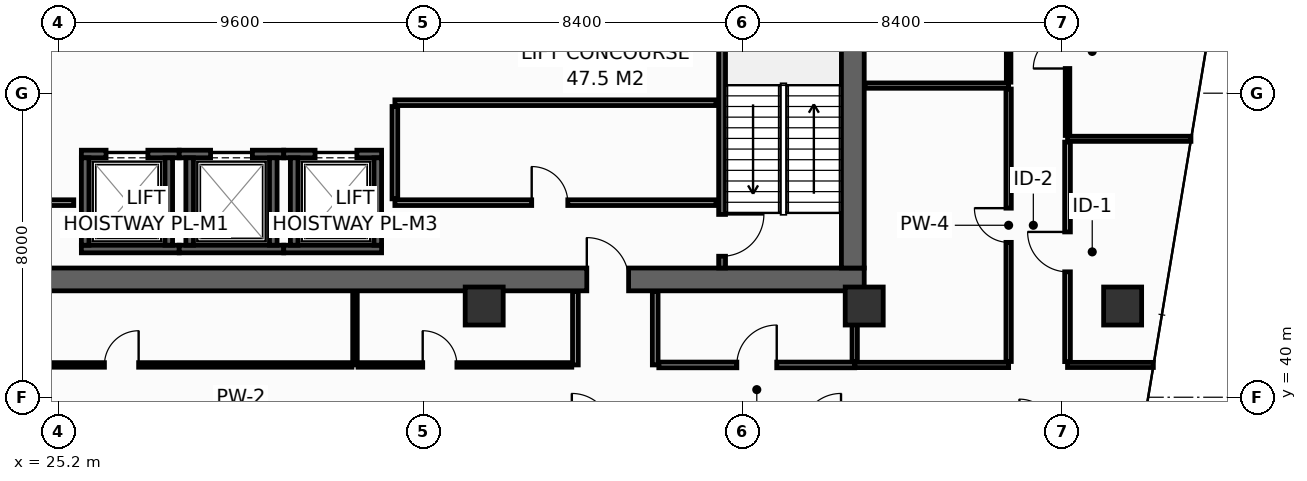
"""IFC4 building model, lengths in metres.
Left out: names, types, materials, properties, quantities, classifications, styles, units other than length and angle.
Written with IfcOpenShell. Run it as: python <this file> out.ifc"""

import sys

from ifc_helpers import new_model, si_unit, direction, frame, frame_2d, origin, origin_2d, place, context, subcontext, project, spatial, rectangle, hollow_rectangle, extrude, element, fill, save


model = new_model("IFC4")
c1 = context("Model", 3, precision=1e-05, world=origin(), true_north=direction((0.0, 1.0)))
c2 = subcontext(c1, "Body", "Model", "MODEL_VIEW")
j1 = project(units=[si_unit("LENGTHUNIT", "METRE"), si_unit("PLANEANGLEUNIT", "RADIAN")], contexts=[c1])
p1 = place(None, origin())
s1 = spatial("IfcSite", under=j1, at=p1, CompositionType="ELEMENT")
p2 = place(p1, origin())
s2 = spatial("IfcBuilding", under=s1, at=p2, CompositionType="ELEMENT")
p3 = place(p2, frame((0.0, 0.0, 119.2)))
s3 = spatial("IfcBuildingStorey", under=s2, at=p3, CompositionType="ELEMENT", Elevation=119.2)
p4 = place(p3, frame((13.5, 43.1, 0.0), z_axis=(0.0, 0.0, 1.0), x_axis=(1.0, 0.0, 0.0)))
e1 = element("IfcWall", 1, at=p4, inside=s3, PredefinedType="SHEAR", context=c2, shape_type="SweptSolid", body=[
    extrude(rectangle(XDim=32.9, YDim=0.6, at=frame_2d((16.45, 0.0))), origin(), (0.0, 0.0, 1.0), 3.95),
])
p5 = place(p4, frame((5.4, 0.0, 0.0)))
e2 = element("IfcOpeningElement", 2, at=p5, cuts=e1, PredefinedType="OPENING", context=c2, shape_type="SweptSolid", body=[
    extrude(rectangle(XDim=1.1, YDim=2.15, at=frame_2d((0.55, 1.075))), frame((0.0, 0.31, 0.0), z_axis=(0.0, -1.0, 0.0), x_axis=(1.0, 0.0, 0.0)), (0.0, 0.0, 1.0), 0.62),
])
p6 = place(p4, frame((25.6, 0.0, 0.0)))
e3 = element("IfcOpeningElement", 3, at=p6, cuts=e1, PredefinedType="OPENING", context=c2, shape_type="SweptSolid", body=[
    extrude(rectangle(XDim=1.1, YDim=2.15, at=frame_2d((0.55, 1.075))), frame((0.0, 0.31, 0.0), z_axis=(0.0, -1.0, 0.0), x_axis=(1.0, 0.0, 0.0)), (0.0, 0.0, 1.0), 0.62),
])
p7 = place(p3, frame((46.1, 43.4, 0.0), z_axis=(0.0, 0.0, 1.0), x_axis=(0.0, 1.0, 0.0)))
e4 = element("IfcWall", 4, at=p7, inside=s3, PredefinedType="SHEAR", context=c2, shape_type="SweptSolid", body=[
    extrude(rectangle(XDim=10.4, YDim=0.6, at=frame_2d((5.2, 0.0))), origin(), (0.0, 0.0, 1.0), 3.95),
])
for number, where, z_axis, x_axis in (
    (5, (36.4, 42.4, 0.0), (0.0, 0.0, 1.0), (1.0, 0.0, 0.0)),
    (6, (46.4, 42.4, 0.0), (0.0, 0.0, 1.0), (1.0, 0.0, 0.0)),
    (7, (53.2, 42.4, 0.0), (0.0, 0.0, 1.0), (1.0, 0.0, 0.0)),
):
    element("IfcColumn", number, at=place(p3, frame(where, z_axis=z_axis, x_axis=x_axis)), inside=s3, PredefinedType="COLUMN", context=c2, shape_type="SweptSolid", body=[
        extrude(hollow_rectangle(XDim=1.0, YDim=1.0, WallThickness=0.045, at=origin_2d()), origin(), (0.0, 0.0, 1.0), 4.4),
    ])
p8 = place(p3, frame((25.8, 43.9, 0.0), z_axis=(0.0, 0.0, 1.0), x_axis=(1.0, 0.0, 0.0)))
e8 = element("IfcWall", 8, at=p8, inside=s3, PredefinedType="SHEAR", context=c2, shape_type="SweptSolid", body=[
    extrude(rectangle(XDim=2.575, YDim=0.2, at=frame_2d((1.288, 0.0))), origin(), (0.0, 0.0, 1.0), 3.95),
])
p9 = place(p3, frame((25.8, 46.4, 0.0), z_axis=(0.0, 0.0, 1.0), x_axis=(1.0, 0.0, 0.0)))
e9 = element("IfcWall", 9, at=p9, inside=s3, PredefinedType="SHEAR", context=c2, shape_type="SweptSolid", body=[
    extrude(rectangle(XDim=2.575, YDim=0.2, at=frame_2d((1.288, 0.0))), origin(), (0.0, 0.0, 1.0), 3.95),
])
p10 = place(p9, frame((0.65, 0.0, 0.0)))
e10 = element("IfcOpeningElement", 10, at=p10, cuts=e9, PredefinedType="OPENING", context=c2, shape_type="SweptSolid", body=[
    extrude(rectangle(XDim=1.1, YDim=2.2, at=frame_2d((0.55, 1.1))), frame((0.0, 0.11, 0.0), z_axis=(0.0, -1.0, 0.0), x_axis=(1.0, 0.0, 0.0)), (0.0, 0.0, 1.0), 0.22),
])
for number, where, z_axis, x_axis in (
    (11, (25.9, 44.0, 0.0), (0.0, 0.0, 1.0), (0.0, 1.0, 0.0)),
    (12, (28.1, 44.0, 0.0), (0.0, 0.0, 1.0), (0.0, 1.0, 0.0)),
):
    element("IfcWall", number, at=place(p3, frame(where, z_axis=z_axis, x_axis=x_axis)), inside=s3, PredefinedType="SHEAR", context=c2, shape_type="SweptSolid", body=[
        extrude(rectangle(XDim=2.3, YDim=0.2, at=frame_2d((1.15, 0.0))), origin(), (0.0, 0.0, 1.0), 3.95),
    ])
p11 = place(p3, frame((28.375, 43.9, 0.0), z_axis=(0.0, 0.0, 1.0), x_axis=(1.0, 0.0, 0.0)))
e13 = element("IfcWall", 13, at=p11, inside=s3, PredefinedType="SHEAR", context=c2, shape_type="SweptSolid", body=[
    extrude(rectangle(XDim=2.75, YDim=0.2, at=frame_2d((1.375, 0.0))), origin(), (0.0, 0.0, 1.0), 3.95),
])
p12 = place(p3, frame((28.375, 46.4, 0.0), z_axis=(0.0, 0.0, 1.0), x_axis=(1.0, 0.0, 0.0)))
e14 = element("IfcWall", 14, at=p12, inside=s3, PredefinedType="SHEAR", context=c2, shape_type="SweptSolid", body=[
    extrude(rectangle(XDim=2.75, YDim=0.2, at=frame_2d((1.375, 0.0))), origin(), (0.0, 0.0, 1.0), 3.95),
])
p13 = place(p12, frame((0.825, 0.0, 0.0)))
e15 = element("IfcOpeningElement", 15, at=p13, cuts=e14, PredefinedType="OPENING", context=c2, shape_type="SweptSolid", body=[
    extrude(rectangle(XDim=1.1, YDim=2.2, at=frame_2d((0.55, 1.1))), frame((0.0, 0.11, 0.0), z_axis=(0.0, -1.0, 0.0), x_axis=(1.0, 0.0, 0.0)), (0.0, 0.0, 1.0), 0.22),
])
for number, where, z_axis, x_axis in (
    (16, (28.65, 44.0, 0.0), (0.0, 0.0, 1.0), (0.0, 1.0, 0.0)),
    (17, (30.85, 44.0, 0.0), (0.0, 0.0, 1.0), (0.0, 1.0, 0.0)),
):
    element("IfcWall", number, at=place(p3, frame(where, z_axis=z_axis, x_axis=x_axis)), inside=s3, PredefinedType="SHEAR", context=c2, shape_type="SweptSolid", body=[
        extrude(rectangle(XDim=2.3, YDim=0.2, at=frame_2d((1.15, 0.0))), origin(), (0.0, 0.0, 1.0), 3.95),
    ])
p14 = place(p3, frame((31.125, 43.9, 0.0), z_axis=(0.0, 0.0, 1.0), x_axis=(1.0, 0.0, 0.0)))
e18 = element("IfcWall", 18, at=p14, inside=s3, PredefinedType="SHEAR", context=c2, shape_type="SweptSolid", body=[
    extrude(rectangle(XDim=2.575, YDim=0.2, at=frame_2d((1.288, 0.0))), origin(), (0.0, 0.0, 1.0), 3.95),
])
p15 = place(p3, frame((31.125, 46.4, 0.0), z_axis=(0.0, 0.0, 1.0), x_axis=(1.0, 0.0, 0.0)))
e19 = element("IfcWall", 19, at=p15, inside=s3, PredefinedType="SHEAR", context=c2, shape_type="SweptSolid", body=[
    extrude(rectangle(XDim=2.575, YDim=0.2, at=frame_2d((1.288, 0.0))), origin(), (0.0, 0.0, 1.0), 3.95),
])
p16 = place(p15, frame((0.825, 0.0, 0.0)))
e20 = element("IfcOpeningElement", 20, at=p16, cuts=e19, PredefinedType="OPENING", context=c2, shape_type="SweptSolid", body=[
    extrude(rectangle(XDim=1.1, YDim=2.2, at=frame_2d((0.55, 1.1))), frame((0.0, 0.11, 0.0), z_axis=(0.0, -1.0, 0.0), x_axis=(1.0, 0.0, 0.0)), (0.0, 0.0, 1.0), 0.22),
])
for number, where, z_axis, x_axis in (
    (21, (31.4, 44.0, 0.0), (0.0, 0.0, 1.0), (0.0, 1.0, 0.0)),
    (22, (33.6, 44.0, 0.0), (0.0, 0.0, 1.0), (0.0, 1.0, 0.0)),
):
    element("IfcWall", number, at=place(p3, frame(where, z_axis=z_axis, x_axis=x_axis)), inside=s3, PredefinedType="SHEAR", context=c2, shape_type="SweptSolid", body=[
        extrude(rectangle(XDim=2.3, YDim=0.2, at=frame_2d((1.15, 0.0))), origin(), (0.0, 0.0, 1.0), 3.95),
    ])
p17 = place(p3, frame((42.66, 53.8, 0.0), z_axis=(0.0, 0.0, 1.0), x_axis=(0.0, -1.0, 0.0)))
e23 = element("IfcWall", 23, at=p17, inside=s3, PredefinedType="SHEAR", context=c2, shape_type="SweptSolid", body=[
    extrude(rectangle(XDim=10.4, YDim=0.18, at=frame_2d((5.2, 0.0))), origin(), (0.0, 0.0, 1.0), 3.95),
])
p18 = place(p17, frame((8.99, 0.0, 0.0)))
e24 = element("IfcOpeningElement", 24, at=p18, cuts=e23, PredefinedType="OPENING", context=c2, shape_type="SweptSolid", body=[
    extrude(rectangle(XDim=1.1, YDim=2.15, at=frame_2d((0.55, 1.075))), frame((0.0, 0.1, 0.0), z_axis=(0.0, -1.0, 0.0), x_axis=(1.0, 0.0, 0.0)), (0.0, 0.0, 1.0), 0.2),
])
p19 = place(p3, frame((22.68, 45.12, 0.0), z_axis=(0.0, 0.0, 1.0), x_axis=(1.0, 0.0, 0.0)))
e25 = element("IfcWall", 25, at=p19, inside=s3, PredefinedType="PARTITIONING", context=c2, shape_type="SweptSolid", body=[
    extrude(rectangle(XDim=2.92, YDim=0.15, at=frame_2d((1.46, 0.0))), origin(), (0.0, 0.0, 1.0), 3.95),
])
p20 = place(p19, frame((0.85, 0.0, 0.0)))
e26 = element("IfcOpeningElement", 26, at=p20, cuts=e25, PredefinedType="OPENING", context=c2, shape_type="SweptSolid", body=[
    extrude(rectangle(XDim=1.1, YDim=2.15, at=frame_2d((0.55, 1.075))), frame((0.0, 0.085, 0.0), z_axis=(0.0, -1.0, 0.0), x_axis=(1.0, 0.0, 0.0)), (0.0, 0.0, 1.0), 0.17),
])
p21 = place(p3, frame((34.05, 45.12, 0.0), z_axis=(0.0, 0.0, 1.0), x_axis=(1.0, 0.0, 0.0)))
e27 = element("IfcWall", 27, at=p21, inside=s3, PredefinedType="PARTITIONING", context=c2, shape_type="SweptSolid", body=[
    extrude(rectangle(XDim=8.45, YDim=0.15, at=frame_2d((4.225, 0.0))), origin(), (0.0, 0.0, 1.0), 3.95),
])
p22 = place(p21, frame((3.6, 0.0, 0.0)))
e28 = element("IfcOpeningElement", 28, at=p22, cuts=e27, PredefinedType="OPENING", context=c2, shape_type="SweptSolid", body=[
    extrude(rectangle(XDim=0.95, YDim=2.15, at=frame_2d((0.475, 1.075))), frame((0.0, 0.085, 0.0), z_axis=(0.0, -1.0, 0.0), x_axis=(1.0, 0.0, 0.0)), (0.0, 0.0, 1.0), 0.17),
])
p23 = place(p3, frame((34.05, 47.75, 0.0), z_axis=(0.0, 0.0, 1.0), x_axis=(1.0, 0.0, 0.0)))
e29 = element("IfcWall", 29, at=p23, inside=s3, PredefinedType="PARTITIONING", context=c2, shape_type="SweptSolid", body=[
    extrude(rectangle(XDim=8.45, YDim=0.15, at=frame_2d((4.225, 0.0))), origin(), (0.0, 0.0, 1.0), 3.95),
])
p24 = place(p3, frame((34.05, 45.22, 0.0), z_axis=(0.0, 0.0, 1.0), x_axis=(0.0, 1.0, 0.0)))
e30 = element("IfcWall", 30, at=p24, inside=s3, PredefinedType="PARTITIONING", context=c2, shape_type="SweptSolid", body=[
    extrude(rectangle(XDim=2.43, YDim=0.15, at=frame_2d((1.215, 0.0))), origin(), (0.0, 0.0, 1.0), 3.95),
])
p25 = place(p3, frame((46.15, 40.85, 0.0), z_axis=(0.0, 0.0, 1.0), x_axis=(1.0, 0.0, 0.0)))
e31 = element("IfcWall", 31, at=p25, inside=s3, PredefinedType="PARTITIONING", context=c2, shape_type="SweptSolid", body=[
    extrude(rectangle(XDim=4.05, YDim=0.14, at=frame_2d((2.025, 0.0))), origin(), (0.0, 0.0, 1.0), 3.95),
])
p26 = place(p3, frame((46.15, 40.94, 0.0), z_axis=(0.0, 0.0, 1.0), x_axis=(0.0, 1.0, 0.0)))
e32 = element("IfcWall", 32, at=p26, inside=s3, PredefinedType="PARTITIONING", context=c2, shape_type="SweptSolid", body=[
    extrude(rectangle(XDim=1.84, YDim=0.14, at=frame_2d((0.92, 0.0))), origin(), (0.0, 0.0, 1.0), 3.95),
])
p27 = place(p3, frame((46.42, 48.2, 0.0), z_axis=(0.0, 0.0, 1.0), x_axis=(1.0, 0.0, 0.0)))
e33 = element("IfcWall", 33, at=p27, inside=s3, PredefinedType="PARTITIONING", context=c2, shape_type="SweptSolid", body=[
    extrude(rectangle(XDim=3.78, YDim=0.14, at=frame_2d((1.89, 0.0))), origin(), (0.0, 0.0, 1.0), 3.95),
])
p28 = place(p3, frame((50.2, 40.94, 0.0), z_axis=(0.0, 0.0, 1.0), x_axis=(0.0, 1.0, 0.0)))
e34 = element("IfcWall", 34, at=p28, inside=s3, PredefinedType="PARTITIONING", context=c2, shape_type="SweptSolid", body=[
    extrude(rectangle(XDim=7.17, YDim=0.14, at=frame_2d((3.585, 0.0))), origin(), (0.0, 0.0, 1.0), 3.135),
])
p29 = place(p28, frame((3.135, 0.0, 0.0)))
e35 = element("IfcOpeningElement", 35, at=p29, cuts=e34, PredefinedType="OPENING", context=c2, shape_type="SweptSolid", body=[
    extrude(rectangle(XDim=0.9, YDim=2.1, at=frame_2d((0.45, 1.05))), frame((0.0, 0.08, 0.0), z_axis=(0.0, -1.0, 0.0), x_axis=(1.0, 0.0, 0.0)), (0.0, 0.0, 1.0), 0.16),
])
p30 = place(p3, frame((50.2, 48.29, 0.0), z_axis=(0.0, 0.0, 1.0), x_axis=(0.0, 1.0, 0.0)))
e36 = element("IfcWall", 36, at=p30, inside=s3, PredefinedType="PARTITIONING", context=c2, shape_type="SweptSolid", body=[
    extrude(rectangle(XDim=7.705, YDim=0.12, at=frame_2d((3.853, 0.0))), origin(), (0.0, 0.0, 1.0), 3.235),
])
p31 = place(p30, frame((3.402, 0.0, 0.0)))
e37 = element("IfcOpeningElement", 37, at=p31, cuts=e36, PredefinedType="OPENING", context=c2, shape_type="SweptSolid", body=[
    extrude(rectangle(XDim=0.9, YDim=2.1, at=frame_2d((0.45, 1.05))), frame((0.0, 0.07, 0.0), z_axis=(0.0, -1.0, 0.0), x_axis=(1.0, 0.0, 0.0)), (0.0, 0.0, 1.0), 0.14),
])
p32 = place(p3, frame((51.75, 40.85, 0.0), z_axis=(0.0, 0.0, 1.0), x_axis=(1.0, 0.0, 0.0)))
e38 = element("IfcWall", 38, at=p32, inside=s3, PredefinedType="PARTITIONING", context=c2, shape_type="SweptSolid", body=[
    extrude(rectangle(XDim=2.258, YDim=0.135, at=frame_2d((1.129, 0.0))), origin(), (0.0, 0.0, 1.0), 3.435),
])
p33 = place(p3, frame((51.75, 46.8, 0.0), z_axis=(0.0, 0.0, 1.0), x_axis=(1.0, 0.0, 0.0)))
e39 = element("IfcWall", 39, at=p33, inside=s3, PredefinedType="PARTITIONING", context=c2, shape_type="SweptSolid", body=[
    extrude(rectangle(XDim=3.247, YDim=0.135, at=frame_2d((1.624, 0.0))), origin(), (0.0, 0.0, 1.0), 3.135),
])
p34 = place(p3, frame((51.75, 40.938, 0.0), z_axis=(0.0, 0.0, 1.0), x_axis=(0.0, 1.0, 0.0)))
e40 = element("IfcWall", 40, at=p34, inside=s3, PredefinedType="PARTITIONING", context=c2, shape_type="SweptSolid", body=[
    extrude(rectangle(XDim=5.775, YDim=0.15, at=frame_2d((2.887, 0.0))), origin(), (0.0, 0.0, 1.0), 3.135),
])
p35 = place(p34, frame((2.362, 0.0, 0.0)))
e41 = element("IfcOpeningElement", 41, at=p35, cuts=e40, PredefinedType="OPENING", context=c2, shape_type="SweptSolid", body=[
    extrude(rectangle(XDim=1.05, YDim=2.15, at=frame_2d((0.525, 1.075))), frame((0.0, 0.085, 0.0), z_axis=(0.0, -1.0, 0.0), x_axis=(1.0, 0.0, 0.0)), (0.0, 0.0, 1.0), 0.17),
])
p36 = place(p3, frame((51.75, 46.887, 0.0), z_axis=(0.0, 0.0, 1.0), x_axis=(0.0, 1.0, 0.0)))
e42 = element("IfcWall", 42, at=p36, inside=s3, PredefinedType="PARTITIONING", context=c2, shape_type="SweptSolid", body=[
    extrude(rectangle(XDim=4.425, YDim=0.12, at=frame_2d((2.212, 0.0))), origin(), (0.0, 0.0, 1.0), 3.95),
])
p37 = place(p36, frame((1.762, 0.0, 0.0)))
e43 = element("IfcOpeningElement", 43, at=p37, cuts=e42, PredefinedType="OPENING", context=c2, shape_type="SweptSolid", body=[
    extrude(rectangle(XDim=0.9, YDim=2.1, at=frame_2d((0.45, 1.05))), frame((0.0, 0.07, 0.0), z_axis=(0.0, -1.0, 0.0), x_axis=(1.0, 0.0, 0.0)), (0.0, 0.0, 1.0), 0.14),
])
for number, where, z_axis, x_axis in (
    (44, (38.8, 40.85, 0.0), (0.0, 0.0, 1.0), (0.0, 1.0, 0.0)),
    (45, (40.9, 40.85, 0.0), (0.0, 0.0, 1.0), (0.0, 1.0, 0.0)),
):
    element("IfcWall", number, at=place(p3, frame(where, z_axis=z_axis, x_axis=x_axis)), inside=s3, PredefinedType="PARTITIONING", context=c2, shape_type="SweptSolid", body=[
        extrude(rectangle(XDim=1.93, YDim=0.15, at=frame_2d((0.965, 0.0))), origin(), (0.0, 0.0, 1.0), 3.95),
    ])
p38 = place(p3, frame((33.0, 40.85, 0.0), z_axis=(0.0, 0.0, 1.0), x_axis=(0.0, 1.0, 0.0)))
e46 = element("IfcWall", 46, at=p38, inside=s3, PredefinedType="PARTITIONING", context=c2, shape_type="SweptSolid", body=[
    extrude(rectangle(XDim=1.93, YDim=0.12, at=frame_2d((0.965, 0.0))), origin(), (0.0, 0.0, 1.0), 3.135),
])
p39 = place(p3, frame((20.795, 40.85, 0.0), z_axis=(0.0, 0.0, 1.0), x_axis=(1.0, 0.0, 0.0)))
e47 = element("IfcWall", 47, at=p39, inside=s3, PredefinedType="PARTITIONING", context=c2, shape_type="SweptSolid", body=[
    extrude(rectangle(XDim=12.125, YDim=0.12, at=frame_2d((6.062, 0.0))), origin(), (0.0, 0.0, 1.0), 3.135),
])
p40 = place(p39, frame((5.612, 0.0, 0.0)))
e48 = element("IfcOpeningElement", 48, at=p40, cuts=e47, PredefinedType="OPENING", context=c2, shape_type="SweptSolid", body=[
    extrude(rectangle(XDim=0.9, YDim=2.1, at=frame_2d((0.45, 1.05))), frame((0.0, 0.07, 0.0), z_axis=(0.0, -1.0, 0.0), x_axis=(1.0, 0.0, 0.0)), (0.0, 0.0, 1.0), 0.14),
])
p41 = place(p3, frame((33.08, 40.85, 0.0), z_axis=(0.0, 0.0, 1.0), x_axis=(1.0, 0.0, 0.0)))
e49 = element("IfcWall", 49, at=p41, inside=s3, PredefinedType="PARTITIONING", context=c2, shape_type="SweptSolid", body=[
    extrude(rectangle(XDim=5.625, YDim=0.12, at=frame_2d((2.812, 0.0))), origin(), (0.0, 0.0, 1.0), 3.135),
])
p42 = place(p41, frame((1.702, 0.0, 0.0)))
e50 = element("IfcOpeningElement", 50, at=p42, cuts=e49, PredefinedType="OPENING", context=c2, shape_type="SweptSolid", body=[
    extrude(rectangle(XDim=0.9, YDim=2.1, at=frame_2d((0.45, 1.05))), frame((0.0, 0.07, 0.0), z_axis=(0.0, -1.0, 0.0), x_axis=(1.0, 0.0, 0.0)), (0.0, 0.0, 1.0), 0.14),
])
p43 = place(p3, frame((40.995, 40.85, 0.0), z_axis=(0.0, 0.0, 1.0), x_axis=(1.0, 0.0, 0.0)))
e51 = element("IfcWall", 51, at=p43, inside=s3, PredefinedType="PARTITIONING", context=c2, shape_type="SweptSolid", body=[
    extrude(rectangle(XDim=5.155, YDim=0.15, at=frame_2d((2.577, 0.0))), origin(), (0.0, 0.0, 1.0), 3.95),
])
p44 = place(p43, frame((2.053, 0.0, 0.0)))
e52 = element("IfcOpeningElement", 52, at=p44, cuts=e51, PredefinedType="OPENING", context=c2, shape_type="SweptSolid", body=[
    extrude(rectangle(XDim=1.05, YDim=2.15, at=frame_2d((0.525, 1.075))), frame((0.0, 0.085, 0.0), z_axis=(0.0, -1.0, 0.0), x_axis=(1.0, 0.0, 0.0)), (0.0, 0.0, 1.0), 0.17),
])
p45 = place(p10, origin())
e53 = element("IfcDoor", 53, at=p45, inside=s3, OperationType="SLIDING_TO_LEFT", PredefinedType="DOOR", context=c2, shape_type="SweptSolid", body=[
    extrude(rectangle(XDim=1.1, YDim=2.2, at=frame_2d((0.55, 1.1))), frame((0.0, 0.025, 0.0), z_axis=(0.0, -1.0, 0.0), x_axis=(1.0, 0.0, 0.0)), (0.0, 0.0, 1.0), 0.05),
])
fill(e10, e53)
p46 = place(p13, origin())
e54 = element("IfcDoor", 54, at=p46, inside=s3, OperationType="SLIDING_TO_LEFT", PredefinedType="DOOR", context=c2, shape_type="SweptSolid", body=[
    extrude(rectangle(XDim=1.1, YDim=2.2, at=frame_2d((0.55, 1.1))), frame((0.0, 0.025, 0.0), z_axis=(0.0, -1.0, 0.0), x_axis=(1.0, 0.0, 0.0)), (0.0, 0.0, 1.0), 0.05),
])
fill(e15, e54)
p47 = place(p16, origin())
e55 = element("IfcDoor", 55, at=p47, inside=s3, OperationType="SLIDING_TO_LEFT", PredefinedType="DOOR", context=c2, shape_type="SweptSolid", body=[
    extrude(rectangle(XDim=1.1, YDim=2.2, at=frame_2d((0.55, 1.1))), frame((0.0, 0.025, 0.0), z_axis=(0.0, -1.0, 0.0), x_axis=(1.0, 0.0, 0.0)), (0.0, 0.0, 1.0), 0.05),
])
fill(e20, e55)
p48 = place(p18, origin())
e56 = element("IfcDoor", 56, at=p48, inside=s3, OperationType="SINGLE_SWING_LEFT", PredefinedType="DOOR", context=c2, shape_type="SweptSolid", body=[
    extrude(rectangle(XDim=1.1, YDim=2.15, at=frame_2d((0.55, 1.075))), frame((0.0, 0.025, 0.0), z_axis=(0.0, -1.0, 0.0), x_axis=(1.0, 0.0, 0.0)), (0.0, 0.0, 1.0), 0.05),
])
fill(e24, e56)
p49 = place(p6, origin())
e57 = element("IfcDoor", 57, at=p49, inside=s3, OperationType="SINGLE_SWING_LEFT", PredefinedType="DOOR", context=c2, shape_type="SweptSolid", body=[
    extrude(rectangle(XDim=1.1, YDim=2.15, at=frame_2d((0.55, 1.075))), frame((0.0, 0.025, 0.0), z_axis=(0.0, -1.0, 0.0), x_axis=(1.0, 0.0, 0.0)), (0.0, 0.0, 1.0), 0.05),
])
fill(e3, e57)
p50 = place(p22, origin())
e58 = element("IfcDoor", 58, at=p50, inside=s3, OperationType="SINGLE_SWING_LEFT", PredefinedType="DOOR", context=c2, shape_type="SweptSolid", body=[
    extrude(rectangle(XDim=0.95, YDim=2.15, at=frame_2d((0.475, 1.075))), frame((0.0, 0.025, 0.0), z_axis=(0.0, -1.0, 0.0), x_axis=(1.0, 0.0, 0.0)), (0.0, 0.0, 1.0), 0.05),
])
fill(e28, e58)
p51 = place(p29, origin())
e59 = element("IfcDoor", 59, at=p51, inside=s3, OperationType="SINGLE_SWING_RIGHT", PredefinedType="DOOR", context=c2, shape_type="SweptSolid", body=[
    extrude(rectangle(XDim=0.9, YDim=2.1, at=frame_2d((0.45, 1.05))), frame((0.0, 0.025, 0.0), z_axis=(0.0, -1.0, 0.0), x_axis=(1.0, 0.0, 0.0)), (0.0, 0.0, 1.0), 0.05),
])
fill(e35, e59)
p52 = place(p35, origin())
e60 = element("IfcDoor", 60, at=p52, inside=s3, OperationType="SINGLE_SWING_RIGHT", PredefinedType="DOOR", context=c2, shape_type="SweptSolid", body=[
    extrude(rectangle(XDim=1.05, YDim=2.15, at=frame_2d((0.525, 1.075))), frame((0.0, 0.025, 0.0), z_axis=(0.0, -1.0, 0.0), x_axis=(1.0, 0.0, 0.0)), (0.0, 0.0, 1.0), 0.05),
])
fill(e41, e60)
p53 = place(p37, origin())
e61 = element("IfcDoor", 61, at=p53, inside=s3, OperationType="SINGLE_SWING_LEFT", PredefinedType="DOOR", context=c2, shape_type="SweptSolid", body=[
    extrude(rectangle(XDim=0.9, YDim=2.1, at=frame_2d((0.45, 1.05))), frame((0.0, 0.025, 0.0), z_axis=(0.0, -1.0, 0.0), x_axis=(1.0, 0.0, 0.0)), (0.0, 0.0, 1.0), 0.05),
])
fill(e43, e61)
p54 = place(p40, origin())
e62 = element("IfcDoor", 62, at=p54, inside=s3, OperationType="SINGLE_SWING_RIGHT", PredefinedType="DOOR", context=c2, shape_type="SweptSolid", body=[
    extrude(rectangle(XDim=0.9, YDim=2.1, at=frame_2d((0.45, 1.05))), frame((0.0, 0.025, 0.0), z_axis=(0.0, -1.0, 0.0), x_axis=(1.0, 0.0, 0.0)), (0.0, 0.0, 1.0), 0.05),
])
fill(e48, e62)
p55 = place(p42, origin())
e63 = element("IfcDoor", 63, at=p55, inside=s3, OperationType="SINGLE_SWING_LEFT", PredefinedType="DOOR", context=c2, shape_type="SweptSolid", body=[
    extrude(rectangle(XDim=0.9, YDim=2.1, at=frame_2d((0.45, 1.05))), frame((0.0, 0.025, 0.0), z_axis=(0.0, -1.0, 0.0), x_axis=(1.0, 0.0, 0.0)), (0.0, 0.0, 1.0), 0.05),
])
fill(e50, e63)
p56 = place(p44, origin())
e64 = element("IfcDoor", 64, at=p56, inside=s3, OperationType="SINGLE_SWING_RIGHT", PredefinedType="DOOR", context=c2, shape_type="SweptSolid", body=[
    extrude(rectangle(XDim=1.05, YDim=2.15, at=frame_2d((0.525, 1.075))), frame((0.0, 0.025, 0.0), z_axis=(0.0, -1.0, 0.0), x_axis=(1.0, 0.0, 0.0)), (0.0, 0.0, 1.0), 0.05),
])
fill(e52, e64)
save(model, sys.argv[1])
